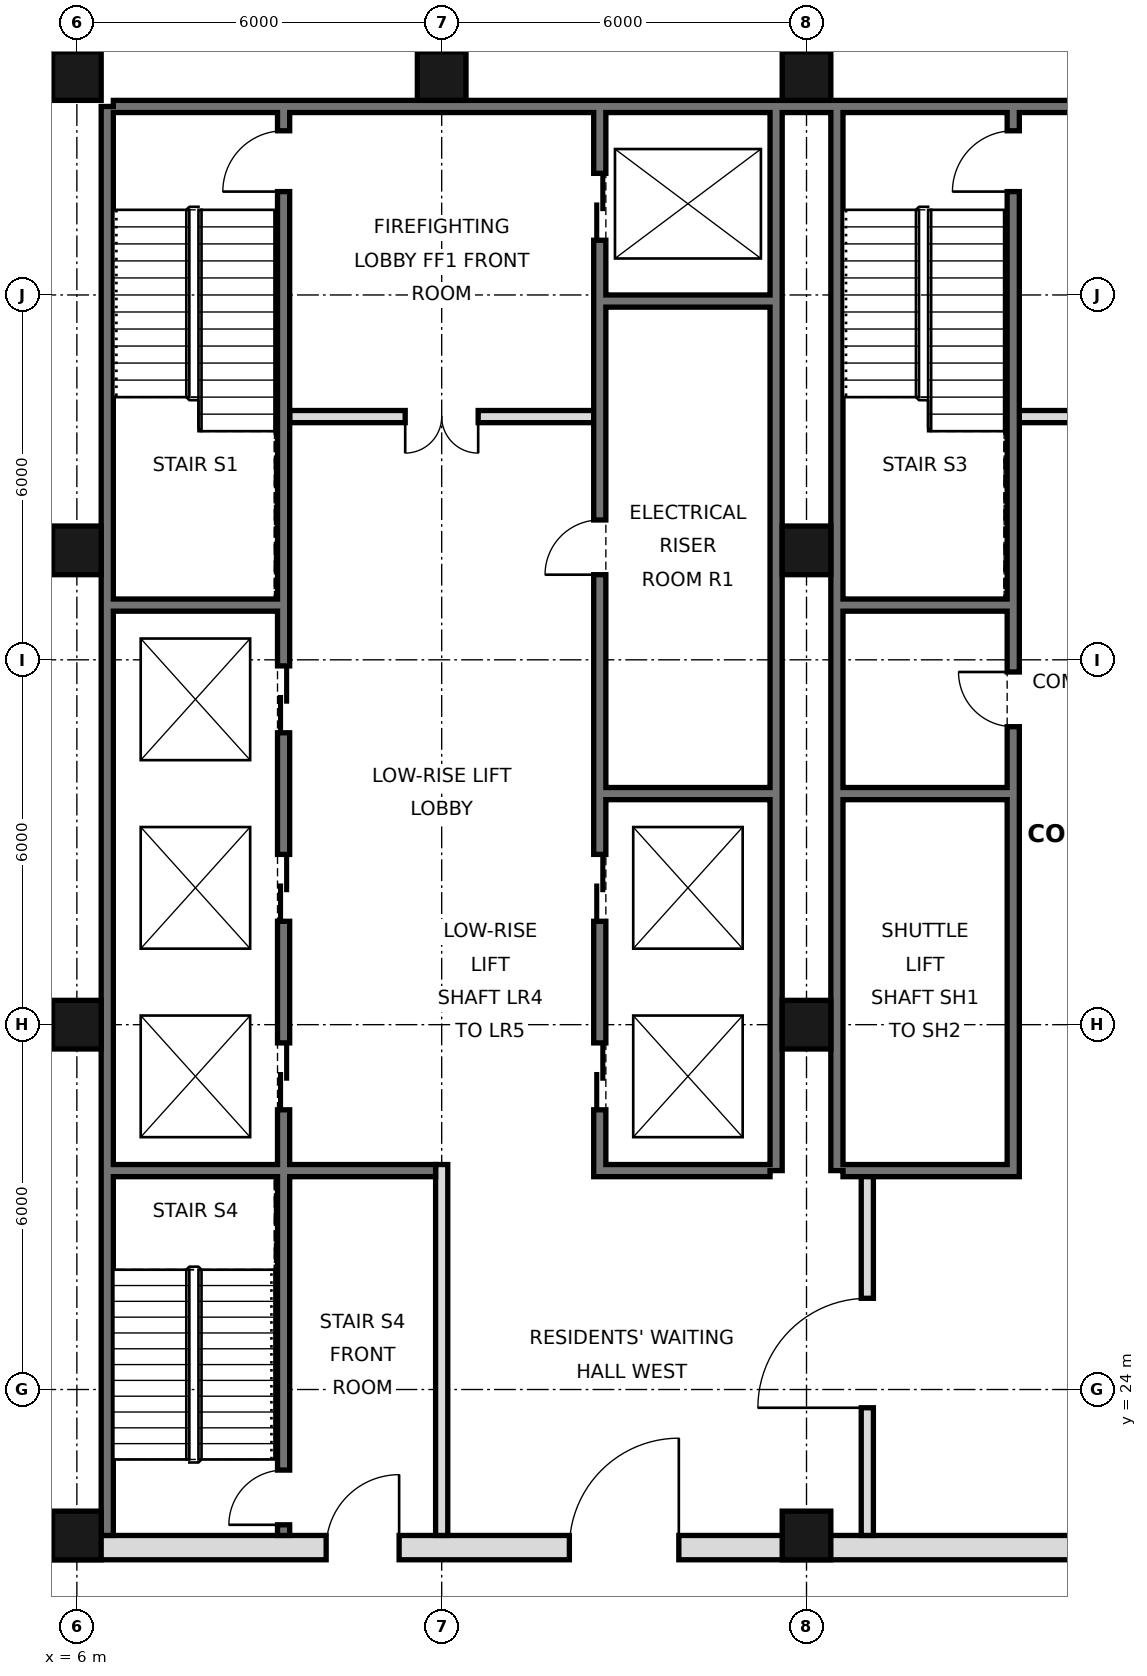
"""IFC4 building model, lengths in metres.
Left out: names, types, materials, properties, quantities, classifications, styles, units other than length and angle.
Written with IfcOpenShell. Run it as: python <this file> out.ifc"""

import sys

from ifc_helpers import new_model, si_unit, direction, frame, frame_2d, origin, origin_2d, place, context, subcontext, project, spatial, rectangle, hollow_rectangle, extrude, element, fill, save


model = new_model("IFC4")
c1 = context("Model", 3, precision=1e-05, world=origin(), true_north=direction((0.0, 1.0)))
c2 = subcontext(c1, "Body", "Model", "MODEL_VIEW")
j1 = project(units=[si_unit("LENGTHUNIT", "METRE"), si_unit("PLANEANGLEUNIT", "RADIAN")], contexts=[c1])
p1 = place(None, origin())
s1 = spatial("IfcSite", under=j1, at=p1, CompositionType="ELEMENT")
p2 = place(p1, origin())
s2 = spatial("IfcBuilding", under=s1, at=p2, CompositionType="ELEMENT")
p3 = place(p2, frame((0.0, 0.0, 134.0)))
s3 = spatial("IfcBuildingStorey", under=s2, at=p3, CompositionType="ELEMENT", Elevation=134.0)
for number, where, z_axis, x_axis in (
    (1, (6.0, 21.6, 0.0), (0.0, 0.0, 1.0), (1.0, 0.0, 0.0)),
    (2, (6.0, 30.0, 0.0), (0.0, 0.0, 1.0), (1.0, 0.0, 0.0)),
    (3, (6.0, 37.8, 0.0), (0.0, 0.0, 1.0), (1.0, 0.0, 0.0)),
    (4, (6.0, 45.6, 0.0), (0.0, 0.0, 1.0), (1.0, 0.0, 0.0)),
    (5, (12.0, 45.6, 0.0), (0.0, 0.0, 1.0), (1.0, 0.0, 0.0)),
    (6, (18.0, 21.6, 0.0), (0.0, 0.0, 1.0), (1.0, 0.0, 0.0)),
    (7, (18.0, 30.0, 0.0), (0.0, 0.0, 1.0), (1.0, 0.0, 0.0)),
    (8, (18.0, 37.8, 0.0), (0.0, 0.0, 1.0), (1.0, 0.0, 0.0)),
    (9, (18.0, 45.6, 0.0), (0.0, 0.0, 1.0), (1.0, 0.0, 0.0)),
):
    element("IfcColumn", number, at=place(p3, frame(where, z_axis=z_axis, x_axis=x_axis)), inside=s3, PredefinedType="COLUMN", context=c2, shape_type="SweptSolid", body=[
        extrude(hollow_rectangle(XDim=0.8, YDim=0.8, WallThickness=0.05, at=origin_2d()), origin(), (0.0, 0.0, 1.0), 4.4),
    ])
p4 = place(p3, frame((6.5, 21.6, 0.0), z_axis=(0.0, 0.0, 1.0), x_axis=(0.0, 1.0, 0.0)))
e10 = element("IfcWall", 10, at=p4, inside=s3, PredefinedType="SOLIDWALL", context=c2, shape_type="SweptSolid", body=[
    extrude(rectangle(XDim=23.5, YDim=0.2, at=frame_2d((11.75, 0.0))), origin(), (0.0, 0.0, 1.0), 4.1),
])
p5 = place(p3, frame((6.6, 45.1, 0.0), z_axis=(0.0, 0.0, 1.0), x_axis=(1.0, 0.0, 0.0)))
e11 = element("IfcWall", 11, at=p5, inside=s3, PredefinedType="SOLIDWALL", context=c2, shape_type="SweptSolid", body=[
    extrude(rectangle(XDim=34.8, YDim=0.2, at=frame_2d((17.4, 0.0))), origin(), (0.0, 0.0, 1.0), 4.1),
])
for number, where, z_axis, x_axis in (
    (12, (17.5, 27.6, 0.0), (0.0, 0.0, 1.0), (0.0, 1.0, 0.0)),
    (13, (18.5, 27.6, 0.0), (0.0, 0.0, 1.0), (0.0, 1.0, 0.0)),
):
    element("IfcWall", number, at=place(p3, frame(where, z_axis=z_axis, x_axis=x_axis)), inside=s3, PredefinedType="SOLIDWALL", context=c2, shape_type="SweptSolid", body=[
        extrude(rectangle(XDim=17.5, YDim=0.2, at=frame_2d((8.75, 0.0))), origin(), (0.0, 0.0, 1.0), 4.1),
    ])
p6 = place(p3, frame((5.6, 21.4, 0.0), z_axis=(0.0, 0.0, 1.0), x_axis=(1.0, 0.0, 0.0)))
e14 = element("IfcWall", 14, at=p6, inside=s3, PredefinedType="SOLIDWALL", context=c2, shape_type="SweptSolid", body=[
    extrude(rectangle(XDim=36.8, YDim=0.4, at=frame_2d((18.4, 0.0))), origin(), (0.0, 0.0, 1.0), 4.1),
])
p7 = place(p6, frame((8.5, 0.0, 0.0)))
e15 = element("IfcOpeningElement", 15, at=p7, cuts=e14, PredefinedType="OPENING", context=c2, shape_type="SweptSolid", body=[
    extrude(rectangle(XDim=1.8, YDim=2.1, at=frame_2d((0.9, 1.05))), frame((0.0, 0.21, 0.0), z_axis=(0.0, -1.0, 0.0), x_axis=(1.0, 0.0, 0.0)), (0.0, 0.0, 1.0), 0.42),
])
p8 = place(p6, frame((17.5, 0.0, 0.0)))
e16 = element("IfcOpeningElement", 16, at=p8, cuts=e14, PredefinedType="OPENING", context=c2, shape_type="SweptSolid", body=[
    extrude(rectangle(XDim=1.8, YDim=2.1, at=frame_2d((0.9, 1.05))), frame((0.0, 0.21, 0.0), z_axis=(0.0, -1.0, 0.0), x_axis=(1.0, 0.0, 0.0)), (0.0, 0.0, 1.0), 0.42),
])
p9 = place(p6, frame((26.5, 0.0, 0.0)))
e17 = element("IfcOpeningElement", 17, at=p9, cuts=e14, PredefinedType="OPENING", context=c2, shape_type="SweptSolid", body=[
    extrude(rectangle(XDim=1.8, YDim=2.1, at=frame_2d((0.9, 1.05))), frame((0.0, 0.21, 0.0), z_axis=(0.0, -1.0, 0.0), x_axis=(1.0, 0.0, 0.0)), (0.0, 0.0, 1.0), 0.42),
])
p10 = place(p6, frame((4.5, 0.0, 0.0)))
e18 = element("IfcOpeningElement", 18, at=p10, cuts=e14, PredefinedType="OPENING", context=c2, shape_type="SweptSolid", body=[
    extrude(rectangle(XDim=1.2, YDim=2.1, at=frame_2d((0.6, 1.05))), frame((0.0, 0.21, 0.0), z_axis=(0.0, -1.0, 0.0), x_axis=(1.0, 0.0, 0.0)), (0.0, 0.0, 1.0), 0.42),
])
p11 = place(p6, frame((31.1, 0.0, 0.0)))
e19 = element("IfcOpeningElement", 19, at=p11, cuts=e14, PredefinedType="OPENING", context=c2, shape_type="SweptSolid", body=[
    extrude(rectangle(XDim=1.2, YDim=2.1, at=frame_2d((0.6, 1.05))), frame((0.0, 0.21, 0.0), z_axis=(0.0, -1.0, 0.0), x_axis=(1.0, 0.0, 0.0)), (0.0, 0.0, 1.0), 0.42),
])
p12 = place(p3, frame((19.0, 21.6, 0.0), z_axis=(0.0, 0.0, 1.0), x_axis=(0.0, 1.0, 0.0)))
e20 = element("IfcWall", 20, at=p12, inside=s3, PredefinedType="PARTITIONING", context=c2, shape_type="SweptSolid", body=[
    extrude(rectangle(XDim=6.0, YDim=0.2, at=frame_2d((3.0, 0.0))), origin(), (0.0, 0.0, 1.0), 4.1),
])
p13 = place(p12, frame((2.1, 0.0, 0.0)))
e21 = element("IfcOpeningElement", 21, at=p13, cuts=e20, PredefinedType="OPENING", context=c2, shape_type="SweptSolid", body=[
    extrude(rectangle(XDim=1.8, YDim=2.1, at=frame_2d((0.9, 1.05))), frame((0.0, 0.11, 0.0), z_axis=(0.0, -1.0, 0.0), x_axis=(1.0, 0.0, 0.0)), (0.0, 0.0, 1.0), 0.22),
])
p14 = place(p3, frame((12.0, 21.6, 0.0), z_axis=(0.0, 0.0, 1.0), x_axis=(0.0, 1.0, 0.0)))
e22 = element("IfcWall", 22, at=p14, inside=s3, PredefinedType="PARTITIONING", context=c2, shape_type="SweptSolid", body=[
    extrude(rectangle(XDim=6.1, YDim=0.2, at=frame_2d((3.05, 0.0))), origin(), (0.0, 0.0, 1.0), 4.1),
])
p15 = place(p3, frame((14.6, 27.5, 0.0), z_axis=(0.0, 0.0, 1.0), x_axis=(0.0, 1.0, 0.0)))
e23 = element("IfcWall", 23, at=p15, inside=s3, PredefinedType="SOLIDWALL", context=c2, shape_type="SweptSolid", body=[
    extrude(rectangle(XDim=17.5, YDim=0.2, at=frame_2d((8.75, 0.0))), origin(), (0.0, 0.0, 1.0), 4.1),
])
p16 = place(p15, frame((1.1, 0.0, 0.0)))
e24 = element("IfcOpeningElement", 24, at=p16, cuts=e23, PredefinedType="OPENING", context=c2, shape_type="SweptSolid", body=[
    extrude(rectangle(XDim=1.1, YDim=2.1, at=frame_2d((0.55, 1.05))), frame((0.0, 0.11, 0.0), z_axis=(0.0, -1.0, 0.0), x_axis=(1.0, 0.0, 0.0)), (0.0, 0.0, 1.0), 0.22),
])
p17 = place(p15, frame((4.2, 0.0, 0.0)))
e25 = element("IfcOpeningElement", 25, at=p17, cuts=e23, PredefinedType="OPENING", context=c2, shape_type="SweptSolid", body=[
    extrude(rectangle(XDim=1.1, YDim=2.1, at=frame_2d((0.55, 1.05))), frame((0.0, 0.11, 0.0), z_axis=(0.0, -1.0, 0.0), x_axis=(1.0, 0.0, 0.0)), (0.0, 0.0, 1.0), 0.22),
])
p18 = place(p15, frame((15.4, 0.0, 0.0)))
e26 = element("IfcOpeningElement", 26, at=p18, cuts=e23, PredefinedType="OPENING", context=c2, shape_type="SweptSolid", body=[
    extrude(rectangle(XDim=1.1, YDim=2.1, at=frame_2d((0.55, 1.05))), frame((0.0, 0.11, 0.0), z_axis=(0.0, -1.0, 0.0), x_axis=(1.0, 0.0, 0.0)), (0.0, 0.0, 1.0), 0.22),
])
p19 = place(p15, frame((9.9, 0.0, 0.0)))
e27 = element("IfcOpeningElement", 27, at=p19, cuts=e23, PredefinedType="OPENING", context=c2, shape_type="SweptSolid", body=[
    extrude(rectangle(XDim=0.9, YDim=2.1, at=frame_2d((0.45, 1.05))), frame((0.0, 0.11, 0.0), z_axis=(0.0, -1.0, 0.0), x_axis=(1.0, 0.0, 0.0)), (0.0, 0.0, 1.0), 0.22),
])
p20 = place(p3, frame((21.4, 27.5, 0.0), z_axis=(0.0, 0.0, 1.0), x_axis=(0.0, 1.0, 0.0)))
e28 = element("IfcWall", 28, at=p20, inside=s3, PredefinedType="SOLIDWALL", context=c2, shape_type="SweptSolid", body=[
    extrude(rectangle(XDim=17.5, YDim=0.2, at=frame_2d((8.75, 0.0))), origin(), (0.0, 0.0, 1.0), 4.1),
])
p21 = place(p20, frame((16.2, 0.0, 0.0)))
e29 = element("IfcOpeningElement", 29, at=p21, cuts=e28, PredefinedType="OPENING", context=c2, shape_type="SweptSolid", body=[
    extrude(rectangle(XDim=1.0, YDim=2.1, at=frame_2d((0.5, 1.05))), frame((0.0, 0.11, 0.0), z_axis=(0.0, -1.0, 0.0), x_axis=(1.0, 0.0, 0.0)), (0.0, 0.0, 1.0), 0.22),
])
p22 = place(p20, frame((7.4, 0.0, 0.0)))
e30 = element("IfcOpeningElement", 30, at=p22, cuts=e28, PredefinedType="OPENING", context=c2, shape_type="SweptSolid", body=[
    extrude(rectangle(XDim=0.9, YDim=2.1, at=frame_2d((0.45, 1.05))), frame((0.0, 0.11, 0.0), z_axis=(0.0, -1.0, 0.0), x_axis=(1.0, 0.0, 0.0)), (0.0, 0.0, 1.0), 0.22),
])
p23 = place(p3, frame((9.4, 21.6, 0.0), z_axis=(0.0, 0.0, 1.0), x_axis=(0.0, 1.0, 0.0)))
e31 = element("IfcWall", 31, at=p23, inside=s3, PredefinedType="SOLIDWALL", context=c2, shape_type="SweptSolid", body=[
    extrude(rectangle(XDim=23.4, YDim=0.2, at=frame_2d((11.7, 0.0))), origin(), (0.0, 0.0, 1.0), 4.1),
])
p24 = place(p23, frame((7.0, 0.0, 0.0)))
e32 = element("IfcOpeningElement", 32, at=p24, cuts=e31, PredefinedType="OPENING", context=c2, shape_type="SweptSolid", body=[
    extrude(rectangle(XDim=1.1, YDim=2.1, at=frame_2d((0.55, 1.05))), frame((0.0, 0.11, 0.0), z_axis=(0.0, -1.0, 0.0), x_axis=(1.0, 0.0, 0.0)), (0.0, 0.0, 1.0), 0.22),
])
p25 = place(p23, frame((10.1, 0.0, 0.0)))
e33 = element("IfcOpeningElement", 33, at=p25, cuts=e31, PredefinedType="OPENING", context=c2, shape_type="SweptSolid", body=[
    extrude(rectangle(XDim=1.1, YDim=2.1, at=frame_2d((0.55, 1.05))), frame((0.0, 0.11, 0.0), z_axis=(0.0, -1.0, 0.0), x_axis=(1.0, 0.0, 0.0)), (0.0, 0.0, 1.0), 0.22),
])
p26 = place(p23, frame((13.2, 0.0, 0.0)))
e34 = element("IfcOpeningElement", 34, at=p26, cuts=e31, PredefinedType="OPENING", context=c2, shape_type="SweptSolid", body=[
    extrude(rectangle(XDim=1.1, YDim=2.1, at=frame_2d((0.55, 1.05))), frame((0.0, 0.11, 0.0), z_axis=(0.0, -1.0, 0.0), x_axis=(1.0, 0.0, 0.0)), (0.0, 0.0, 1.0), 0.22),
])
p27 = place(p23, frame((22.1, 0.0, 0.0)))
e35 = element("IfcOpeningElement", 35, at=p27, cuts=e31, PredefinedType="OPENING", context=c2, shape_type="SweptSolid", body=[
    extrude(rectangle(XDim=1.0, YDim=2.1, at=frame_2d((0.5, 1.05))), frame((0.0, 0.11, 0.0), z_axis=(0.0, -1.0, 0.0), x_axis=(1.0, 0.0, 0.0)), (0.0, 0.0, 1.0), 0.22),
])
p28 = place(p23, frame((0.175, 0.0, 0.0)))
e36 = element("IfcOpeningElement", 36, at=p28, cuts=e31, PredefinedType="OPENING", context=c2, shape_type="SweptSolid", body=[
    extrude(rectangle(XDim=0.9, YDim=2.1, at=frame_2d((0.45, 1.05))), frame((0.0, 0.11, 0.0), z_axis=(0.0, -1.0, 0.0), x_axis=(1.0, 0.0, 0.0)), (0.0, 0.0, 1.0), 0.22),
])
for number, where, z_axis, x_axis in (
    (37, (14.7, 27.6, 0.0), (0.0, 0.0, 1.0), (1.0, 0.0, 0.0)),
    (38, (18.6, 27.6, 0.0), (0.0, 0.0, 1.0), (1.0, 0.0, 0.0)),
):
    element("IfcWall", number, at=place(p3, frame(where, z_axis=z_axis, x_axis=x_axis)), inside=s3, PredefinedType="SOLIDWALL", context=c2, shape_type="SweptSolid", body=[
        extrude(rectangle(XDim=2.7, YDim=0.2, at=frame_2d((1.35, 0.0))), origin(), (0.0, 0.0, 1.0), 4.1),
    ])
p29 = place(p3, frame((6.6, 27.6, 0.0), z_axis=(0.0, 0.0, 1.0), x_axis=(1.0, 0.0, 0.0)))
e39 = element("IfcWall", 39, at=p29, inside=s3, PredefinedType="SOLIDWALL", context=c2, shape_type="SweptSolid", body=[
    extrude(rectangle(XDim=5.3, YDim=0.2, at=frame_2d((2.65, 0.0))), origin(), (0.0, 0.0, 1.0), 4.1),
])
for number, where, z_axis, x_axis in (
    (40, (14.7, 33.8, 0.0), (0.0, 0.0, 1.0), (1.0, 0.0, 0.0)),
    (41, (18.6, 33.8, 0.0), (0.0, 0.0, 1.0), (1.0, 0.0, 0.0)),
    (42, (18.6, 36.9, 0.0), (0.0, 0.0, 1.0), (1.0, 0.0, 0.0)),
    (43, (6.6, 36.9, 0.0), (0.0, 0.0, 1.0), (1.0, 0.0, 0.0)),
):
    element("IfcWall", number, at=place(p3, frame(where, z_axis=z_axis, x_axis=x_axis)), inside=s3, PredefinedType="SOLIDWALL", context=c2, shape_type="SweptSolid", body=[
        extrude(rectangle(XDim=2.7, YDim=0.2, at=frame_2d((1.35, 0.0))), origin(), (0.0, 0.0, 1.0), 4.1),
    ])
p30 = place(p3, frame((21.5, 40.0, 0.0), z_axis=(0.0, 0.0, 1.0), x_axis=(1.0, 0.0, 0.0)))
e44 = element("IfcWall", 44, at=p30, inside=s3, PredefinedType="PARTITIONING", context=c2, shape_type="SweptSolid", body=[
    extrude(rectangle(XDim=5.0, YDim=0.2, at=frame_2d((2.5, 0.0))), origin(), (0.0, 0.0, 1.0), 4.1),
])
p31 = place(p30, frame((1.9, 0.0, 0.0)))
e45 = element("IfcOpeningElement", 45, at=p31, cuts=e44, PredefinedType="OPENING", context=c2, shape_type="SweptSolid", body=[
    extrude(rectangle(XDim=1.2, YDim=2.1, at=frame_2d((0.6, 1.05))), frame((0.0, 0.11, 0.0), z_axis=(0.0, -1.0, 0.0), x_axis=(1.0, 0.0, 0.0)), (0.0, 0.0, 1.0), 0.22),
])
p32 = place(p3, frame((9.5, 40.0, 0.0), z_axis=(0.0, 0.0, 1.0), x_axis=(1.0, 0.0, 0.0)))
e46 = element("IfcWall", 46, at=p32, inside=s3, PredefinedType="PARTITIONING", context=c2, shape_type="SweptSolid", body=[
    extrude(rectangle(XDim=5.0, YDim=0.2, at=frame_2d((2.5, 0.0))), origin(), (0.0, 0.0, 1.0), 4.1),
])
p33 = place(p32, frame((1.9, 0.0, 0.0)))
e47 = element("IfcOpeningElement", 47, at=p33, cuts=e46, PredefinedType="OPENING", context=c2, shape_type="SweptSolid", body=[
    extrude(rectangle(XDim=1.2, YDim=2.1, at=frame_2d((0.6, 1.05))), frame((0.0, 0.11, 0.0), z_axis=(0.0, -1.0, 0.0), x_axis=(1.0, 0.0, 0.0)), (0.0, 0.0, 1.0), 0.22),
])
p34 = place(p3, frame((14.7, 41.9, 0.0), z_axis=(0.0, 0.0, 1.0), x_axis=(1.0, 0.0, 0.0)))
e48 = element("IfcWall", 48, at=p34, inside=s3, PredefinedType="SOLIDWALL", context=c2, shape_type="SweptSolid", body=[
    extrude(rectangle(XDim=2.7, YDim=0.2, at=frame_2d((1.35, 0.0))), origin(), (0.0, 0.0, 1.0), 4.1),
])
p35 = place(p7, frame((1.8, 0.0, 0.0), z_axis=(0.0, 0.0, 1.0), x_axis=(-1.0, 0.0, 0.0)))
e49 = element("IfcDoor", 49, at=p35, inside=s3, OperationType="SINGLE_SWING_LEFT", PredefinedType="DOOR", context=c2, shape_type="SweptSolid", body=[
    extrude(rectangle(XDim=1.8, YDim=2.1, at=frame_2d((0.9, 1.05))), frame((0.0, 0.025, 0.0), z_axis=(0.0, -1.0, 0.0), x_axis=(1.0, 0.0, 0.0)), (0.0, 0.0, 1.0), 0.05),
])
fill(e15, e49)
p36 = place(p13, origin())
e50 = element("IfcDoor", 50, at=p36, inside=s3, OperationType="SINGLE_SWING_LEFT", PredefinedType="DOOR", context=c2, shape_type="SweptSolid", body=[
    extrude(rectangle(XDim=1.8, YDim=2.1, at=frame_2d((0.9, 1.05))), frame((0.0, 0.025, 0.0), z_axis=(0.0, -1.0, 0.0), x_axis=(1.0, 0.0, 0.0)), (0.0, 0.0, 1.0), 0.05),
])
fill(e21, e50)
p37 = place(p10, frame((1.2, 0.0, 0.0), z_axis=(0.0, 0.0, 1.0), x_axis=(-1.0, 0.0, 0.0)))
e51 = element("IfcDoor", 51, at=p37, inside=s3, OperationType="SINGLE_SWING_LEFT", PredefinedType="DOOR", context=c2, shape_type="SweptSolid", body=[
    extrude(rectangle(XDim=1.2, YDim=2.1, at=frame_2d((0.6, 1.05))), frame((0.0, 0.025, 0.0), z_axis=(0.0, -1.0, 0.0), x_axis=(1.0, 0.0, 0.0)), (0.0, 0.0, 1.0), 0.05),
])
fill(e18, e51)
p38 = place(p33, frame((1.2, 0.0, 0.0), z_axis=(0.0, 0.0, 1.0), x_axis=(-1.0, 0.0, 0.0)))
e52 = element("IfcDoor", 52, at=p38, inside=s3, OperationType="DOUBLE_DOOR_SINGLE_SWING", PredefinedType="DOOR", context=c2, shape_type="SweptSolid", body=[
    extrude(rectangle(XDim=1.2, YDim=2.1, at=frame_2d((0.6, 1.05))), frame((0.0, 0.025, 0.0), z_axis=(0.0, -1.0, 0.0), x_axis=(1.0, 0.0, 0.0)), (0.0, 0.0, 1.0), 0.05),
])
fill(e47, e52)
p39 = place(p16, origin())
e53 = element("IfcDoor", 53, at=p39, inside=s3, OperationType="DOUBLE_DOOR_SLIDING", PredefinedType="DOOR", context=c2, shape_type="SweptSolid", body=[
    extrude(rectangle(XDim=1.1, YDim=2.1, at=frame_2d((0.55, 1.05))), frame((0.0, 0.025, 0.0), z_axis=(0.0, -1.0, 0.0), x_axis=(1.0, 0.0, 0.0)), (0.0, 0.0, 1.0), 0.05),
])
fill(e24, e53)
p40 = place(p17, origin())
e54 = element("IfcDoor", 54, at=p40, inside=s3, OperationType="DOUBLE_DOOR_SLIDING", PredefinedType="DOOR", context=c2, shape_type="SweptSolid", body=[
    extrude(rectangle(XDim=1.1, YDim=2.1, at=frame_2d((0.55, 1.05))), frame((0.0, 0.025, 0.0), z_axis=(0.0, -1.0, 0.0), x_axis=(1.0, 0.0, 0.0)), (0.0, 0.0, 1.0), 0.05),
])
fill(e25, e54)
p41 = place(p18, origin())
e55 = element("IfcDoor", 55, at=p41, inside=s3, OperationType="DOUBLE_DOOR_SLIDING", PredefinedType="DOOR", context=c2, shape_type="SweptSolid", body=[
    extrude(rectangle(XDim=1.1, YDim=2.1, at=frame_2d((0.55, 1.05))), frame((0.0, 0.025, 0.0), z_axis=(0.0, -1.0, 0.0), x_axis=(1.0, 0.0, 0.0)), (0.0, 0.0, 1.0), 0.05),
])
fill(e26, e55)
p42 = place(p24, origin())
e56 = element("IfcDoor", 56, at=p42, inside=s3, OperationType="DOUBLE_DOOR_SLIDING", PredefinedType="DOOR", context=c2, shape_type="SweptSolid", body=[
    extrude(rectangle(XDim=1.1, YDim=2.1, at=frame_2d((0.55, 1.05))), frame((0.0, 0.025, 0.0), z_axis=(0.0, -1.0, 0.0), x_axis=(1.0, 0.0, 0.0)), (0.0, 0.0, 1.0), 0.05),
])
fill(e32, e56)
p43 = place(p25, origin())
e57 = element("IfcDoor", 57, at=p43, inside=s3, OperationType="DOUBLE_DOOR_SLIDING", PredefinedType="DOOR", context=c2, shape_type="SweptSolid", body=[
    extrude(rectangle(XDim=1.1, YDim=2.1, at=frame_2d((0.55, 1.05))), frame((0.0, 0.025, 0.0), z_axis=(0.0, -1.0, 0.0), x_axis=(1.0, 0.0, 0.0)), (0.0, 0.0, 1.0), 0.05),
])
fill(e33, e57)
p44 = place(p26, origin())
e58 = element("IfcDoor", 58, at=p44, inside=s3, OperationType="DOUBLE_DOOR_SLIDING", PredefinedType="DOOR", context=c2, shape_type="SweptSolid", body=[
    extrude(rectangle(XDim=1.1, YDim=2.1, at=frame_2d((0.55, 1.05))), frame((0.0, 0.025, 0.0), z_axis=(0.0, -1.0, 0.0), x_axis=(1.0, 0.0, 0.0)), (0.0, 0.0, 1.0), 0.05),
])
fill(e34, e58)
p45 = place(p27, origin())
e59 = element("IfcDoor", 59, at=p45, inside=s3, OperationType="SINGLE_SWING_LEFT", PredefinedType="DOOR", context=c2, shape_type="SweptSolid", body=[
    extrude(rectangle(XDim=1.0, YDim=2.1, at=frame_2d((0.5, 1.05))), frame((0.0, 0.025, 0.0), z_axis=(0.0, -1.0, 0.0), x_axis=(1.0, 0.0, 0.0)), (0.0, 0.0, 1.0), 0.05),
])
fill(e35, e59)
p46 = place(p21, origin())
e60 = element("IfcDoor", 60, at=p46, inside=s3, OperationType="SINGLE_SWING_LEFT", PredefinedType="DOOR", context=c2, shape_type="SweptSolid", body=[
    extrude(rectangle(XDim=1.0, YDim=2.1, at=frame_2d((0.5, 1.05))), frame((0.0, 0.025, 0.0), z_axis=(0.0, -1.0, 0.0), x_axis=(1.0, 0.0, 0.0)), (0.0, 0.0, 1.0), 0.05),
])
fill(e29, e60)
p47 = place(p28, origin())
e61 = element("IfcDoor", 61, at=p47, inside=s3, OperationType="SINGLE_SWING_LEFT", PredefinedType="DOOR", context=c2, shape_type="SweptSolid", body=[
    extrude(rectangle(XDim=0.9, YDim=2.1, at=frame_2d((0.45, 1.05))), frame((0.0, 0.025, 0.0), z_axis=(0.0, -1.0, 0.0), x_axis=(1.0, 0.0, 0.0)), (0.0, 0.0, 1.0), 0.05),
])
fill(e36, e61)
p48 = place(p19, origin())
e62 = element("IfcDoor", 62, at=p48, inside=s3, OperationType="SINGLE_SWING_LEFT", PredefinedType="DOOR", context=c2, shape_type="SweptSolid", body=[
    extrude(rectangle(XDim=0.9, YDim=2.1, at=frame_2d((0.45, 1.05))), frame((0.0, 0.025, 0.0), z_axis=(0.0, -1.0, 0.0), x_axis=(1.0, 0.0, 0.0)), (0.0, 0.0, 1.0), 0.05),
])
fill(e27, e62)
p49 = place(p22, frame((0.9, 0.0, 0.0), z_axis=(0.0, 0.0, 1.0), x_axis=(-1.0, 0.0, 0.0)))
e63 = element("IfcDoor", 63, at=p49, inside=s3, OperationType="SINGLE_SWING_LEFT", PredefinedType="DOOR", context=c2, shape_type="SweptSolid", body=[
    extrude(rectangle(XDim=0.9, YDim=2.1, at=frame_2d((0.45, 1.05))), frame((0.0, 0.025, 0.0), z_axis=(0.0, -1.0, 0.0), x_axis=(1.0, 0.0, 0.0)), (0.0, 0.0, 1.0), 0.05),
])
fill(e30, e63)
save(model, sys.argv[1])
